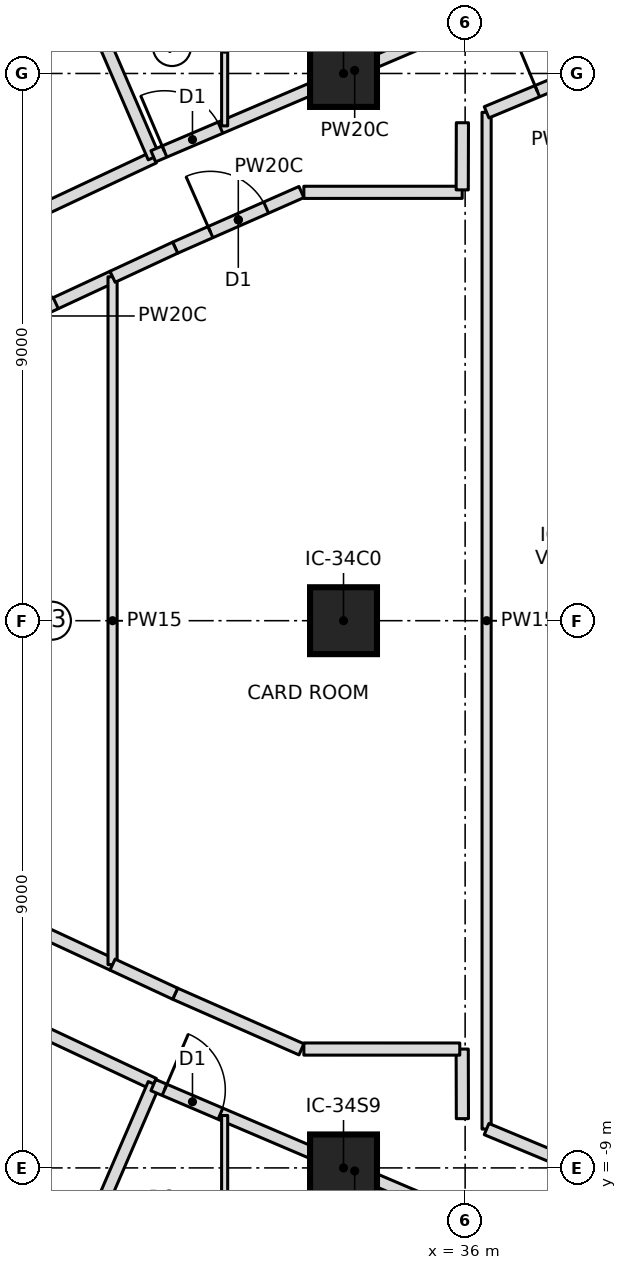
"""IFC4 building model, lengths in metres.
Left out: names, types, materials, properties, quantities, classifications, styles, units other than length and angle.
Written with IfcOpenShell. Run it as: python <this file> out.ifc"""

import sys

from ifc_helpers import new_model, si_unit, direction, frame, frame_2d, origin, origin_2d, place, context, subcontext, project, spatial, rectangle, extrude, element, fill, save


model = new_model("IFC4")
c1 = context("Model", 3, precision=1e-05, world=origin(), true_north=direction((0.0, 1.0)))
c2 = subcontext(c1, "Body", "Model", "MODEL_VIEW")
j1 = project(units=[si_unit("LENGTHUNIT", "METRE"), si_unit("PLANEANGLEUNIT", "RADIAN")], contexts=[c1])
p1 = place(None, origin())
s1 = spatial("IfcSite", under=j1, at=p1, CompositionType="ELEMENT")
p2 = place(p1, origin())
s2 = spatial("IfcBuilding", under=s1, at=p2, CompositionType="ELEMENT")
p3 = place(p2, frame((0.0, 0.0, 144.4)))
s3 = spatial("IfcBuildingStorey", under=s2, at=p3, CompositionType="ELEMENT", Elevation=144.4)
for number, where, z_axis, x_axis in (
    (1, (34.0, -9.0, 0.0), (0.0, 0.0, 1.0), (1.0, 0.0, 0.0)),
    (2, (34.0, 0.0, 0.0), (0.0, 0.0, 1.0), (1.0, 0.0, 0.0)),
    (3, (34.0, 9.0, 0.0), (0.0, 0.0, 1.0), (1.0, 0.0, 0.0)),
):
    element("IfcColumn", number, at=place(p3, frame(where, z_axis=z_axis, x_axis=x_axis)), inside=s3, PredefinedType="COLUMN", context=c2, shape_type="SweptSolid", body=[
        extrude(rectangle(XDim=1.1, YDim=1.1, at=origin_2d()), origin(), (0.0, 0.0, 1.0), 3.55),
    ])
p4 = place(p3, frame((24.36, 4.557, 0.0), z_axis=(0.0, 0.0, 1.0), x_axis=(0.905157912263, 0.425075468439, 0.0)))
e4 = element("IfcWall", 4, at=p4, inside=s3, PredefinedType="PARTITIONING", context=c2, shape_type="SweptSolid", body=[
    extrude(rectangle(XDim=7.203, YDim=0.2, at=frame_2d((3.602, 0.0))), origin(), (0.0, 0.0, 1.0), 3.25),
])
p5 = place(p4, frame((3.7, 0.0, 0.0)))
e5 = element("IfcOpeningElement", 5, at=p5, cuts=e4, PredefinedType="OPENING", context=c2, shape_type="SweptSolid", body=[
    extrude(rectangle(XDim=1.0, YDim=2.1, at=frame_2d((0.5, 1.05))), frame((0.0, 0.11, 0.0), z_axis=(0.0, -1.0, 0.0), x_axis=(1.0, 0.0, 0.0)), (0.0, 0.0, 1.0), 0.22),
])
p6 = place(p3, frame((30.88, 7.619, 0.0), z_axis=(0.0, 0.0, 1.0), x_axis=(-0.395976934703, 0.91826045716, 0.0)))
e6 = element("IfcWall", 6, at=p6, inside=s3, PredefinedType="PARTITIONING", context=c2, shape_type="SweptSolid", body=[
    extrude(rectangle(XDim=7.6, YDim=0.2, at=frame_2d((3.8, 0.0))), origin(), (0.0, 0.0, 1.0), 3.25),
])
p7 = place(p3, frame((30.872, 7.638, 0.0), z_axis=(0.0, 0.0, 1.0), x_axis=(0.919834621271, 0.392306346509, 0.0)))
e7 = element("IfcWall", 7, at=p7, inside=s3, PredefinedType="PARTITIONING", context=c2, shape_type="SweptSolid", body=[
    extrude(rectangle(XDim=7.2, YDim=0.2, at=frame_2d((3.6, 0.0))), origin(), (0.0, 0.0, 1.0), 3.25),
])
p8 = place(p7, frame((0.2, 0.0, 0.0)))
e8 = element("IfcOpeningElement", 8, at=p8, cuts=e7, PredefinedType="OPENING", context=c2, shape_type="SweptSolid", body=[
    extrude(rectangle(XDim=1.0, YDim=2.1, at=frame_2d((0.5, 1.05))), frame((0.0, 0.11, 0.0), z_axis=(0.0, -1.0, 0.0), x_axis=(1.0, 0.0, 0.0)), (0.0, 0.0, 1.0), 0.22),
])
p9 = place(p3, frame((24.36, -4.557, 0.0), z_axis=(0.0, 0.0, 1.0), x_axis=(0.905157912263, -0.425075468439, 0.0)))
e9 = element("IfcWall", 9, at=p9, inside=s3, PredefinedType="PARTITIONING", context=c2, shape_type="SweptSolid", body=[
    extrude(rectangle(XDim=7.203, YDim=0.2, at=frame_2d((3.602, 0.0))), origin(), (0.0, 0.0, 1.0), 3.25),
])
p10 = place(p9, frame((3.7, 0.0, 0.0)))
e10 = element("IfcOpeningElement", 10, at=p10, cuts=e9, PredefinedType="OPENING", context=c2, shape_type="SweptSolid", body=[
    extrude(rectangle(XDim=1.0, YDim=2.1, at=frame_2d((0.5, 1.05))), frame((0.0, 0.11, 0.0), z_axis=(0.0, -1.0, 0.0), x_axis=(1.0, 0.0, 0.0)), (0.0, 0.0, 1.0), 0.22),
])
p11 = place(p3, frame((27.87, -14.598, 0.0), z_axis=(0.0, 0.0, 1.0), x_axis=(0.395976934703, 0.91826045716, 0.0)))
e11 = element("IfcWall", 11, at=p11, inside=s3, PredefinedType="PARTITIONING", context=c2, shape_type="SweptSolid", body=[
    extrude(rectangle(XDim=7.6, YDim=0.2, at=frame_2d((3.8, 0.0))), origin(), (0.0, 0.0, 1.0), 3.25),
])
p12 = place(p3, frame((30.872, -7.638, 0.0), z_axis=(0.0, 0.0, 1.0), x_axis=(0.919834621271, -0.392306346509, 0.0)))
e12 = element("IfcWall", 12, at=p12, inside=s3, PredefinedType="PARTITIONING", context=c2, shape_type="SweptSolid", body=[
    extrude(rectangle(XDim=7.2, YDim=0.2, at=frame_2d((3.6, 0.0))), origin(), (0.0, 0.0, 1.0), 3.25),
])
p13 = place(p12, frame((0.2, 0.0, 0.0)))
e13 = element("IfcOpeningElement", 13, at=p13, cuts=e12, PredefinedType="OPENING", context=c2, shape_type="SweptSolid", body=[
    extrude(rectangle(XDim=1.0, YDim=2.1, at=frame_2d((0.5, 1.05))), frame((0.0, 0.11, 0.0), z_axis=(0.0, -1.0, 0.0), x_axis=(1.0, 0.0, 0.0)), (0.0, 0.0, 1.0), 0.22),
])
p14 = place(p3, frame((27.427, 4.367, 0.0), z_axis=(0.0, 0.0, 1.0), x_axis=(0.906842391635, 0.42146990015, 0.0)))
e14 = element("IfcWall", 14, at=p14, inside=s3, PredefinedType="PARTITIONING", context=c2, shape_type="SweptSolid", body=[
    extrude(rectangle(XDim=3.06, YDim=0.2, at=frame_2d((1.53, 0.0))), origin(), (0.0, 0.0, 1.0), 3.25),
])
p15 = place(p14, frame((1.03, 0.0, 0.0)))
e15 = element("IfcOpeningElement", 15, at=p15, cuts=e14, PredefinedType="OPENING", context=c2, shape_type="SweptSolid", body=[
    extrude(rectangle(XDim=1.0, YDim=2.1, at=frame_2d((0.5, 1.05))), frame((0.0, 0.11, 0.0), z_axis=(0.0, -1.0, 0.0), x_axis=(1.0, 0.0, 0.0)), (0.0, 0.0, 1.0), 0.22),
])
p16 = place(p3, frame((30.202, -5.656, 0.0), z_axis=(0.0, 0.0, 1.0), x_axis=(-0.906842391635, 0.42146990015, 0.0)))
e16 = element("IfcWall", 16, at=p16, inside=s3, PredefinedType="PARTITIONING", context=c2, shape_type="SweptSolid", body=[
    extrude(rectangle(XDim=3.06, YDim=0.2, at=frame_2d((1.53, 0.0))), origin(), (0.0, 0.0, 1.0), 3.25),
])
p17 = place(p3, frame((30.202, -5.656, 0.0), z_axis=(0.0, 0.0, 1.0), x_axis=(0.0, 1.0, 0.0)))
e17 = element("IfcWall", 17, at=p17, inside=s3, PredefinedType="PARTITIONING", context=c2, shape_type="SweptSolid", body=[
    extrude(rectangle(XDim=11.313, YDim=0.15, at=frame_2d((5.656, 0.0))), origin(), (0.0, 0.0, 1.0), 3.25),
])
p18 = place(p3, frame((31.231, 6.135, 0.0), z_axis=(0.0, 0.0, 1.0), x_axis=(0.915102334452, 0.403221672881, 0.0)))
e18 = element("IfcWall", 18, at=p18, inside=s3, PredefinedType="PARTITIONING", context=c2, shape_type="SweptSolid", body=[
    extrude(rectangle(XDim=2.269, YDim=0.2, at=frame_2d((1.135, 0.0))), origin(), (0.0, 0.0, 1.0), 3.25),
])
p19 = place(p18, frame((0.635, 0.0, 0.0)))
e19 = element("IfcOpeningElement", 19, at=p19, cuts=e18, PredefinedType="OPENING", context=c2, shape_type="SweptSolid", body=[
    extrude(rectangle(XDim=1.0, YDim=2.1, at=frame_2d((0.5, 1.05))), frame((0.0, 0.11, 0.0), z_axis=(0.0, -1.0, 0.0), x_axis=(1.0, 0.0, 0.0)), (0.0, 0.0, 1.0), 0.22),
])
p20 = place(p3, frame((33.308, -7.05, 0.0), z_axis=(0.0, 0.0, 1.0), x_axis=(-0.915102334452, 0.403221672881, 0.0)))
e20 = element("IfcWall", 20, at=p20, inside=s3, PredefinedType="PARTITIONING", context=c2, shape_type="SweptSolid", body=[
    extrude(rectangle(XDim=2.269, YDim=0.2, at=frame_2d((1.135, 0.0))), origin(), (0.0, 0.0, 1.0), 3.25),
])
for number, where, z_axis, x_axis in (
    (21, (31.231, -6.135, 0.0), (0.0, 0.0, 1.0), (-0.907, 0.422, 0.0)),
    (22, (30.202, 5.656, 0.0), (0.0, 0.0, 1.0), (0.907, 0.422, 0.0)),
):
    element("IfcWall", number, at=place(p3, frame(where, z_axis=z_axis, x_axis=x_axis)), inside=s3, PredefinedType="PARTITIONING", context=c2, shape_type="SweptSolid", body=[
        extrude(rectangle(XDim=1.135, YDim=0.2, at=frame_2d((0.567, 0.0))), origin(), (0.0, 0.0, 1.0), 3.25),
    ])
p21 = place(p3, frame((36.353, -8.361, 0.0), z_axis=(0.0, 0.0, 1.0), x_axis=(0.0, 1.0, 0.0)))
e23 = element("IfcWall", 23, at=p21, inside=s3, PredefinedType="PARTITIONING", context=c2, shape_type="SweptSolid", body=[
    extrude(rectangle(XDim=16.722, YDim=0.15, at=frame_2d((8.361, 0.0))), origin(), (0.0, 0.0, 1.0), 3.25),
])
p22 = place(p3, frame((36.353, 8.361, 0.0), z_axis=(0.0, 0.0, 1.0), x_axis=(0.922997109092, 0.384806882224, 0.0)))
e24 = element("IfcWall", 24, at=p22, inside=s3, PredefinedType="PARTITIONING", context=c2, shape_type="SweptSolid", body=[
    extrude(rectangle(XDim=2.806, YDim=0.2, at=frame_2d((1.403, 0.0))), origin(), (0.0, 0.0, 1.0), 3.25),
])
p23 = place(p22, frame((0.903, 0.0, 0.0)))
e25 = element("IfcOpeningElement", 25, at=p23, cuts=e24, PredefinedType="OPENING", context=c2, shape_type="SweptSolid", body=[
    extrude(rectangle(XDim=1.0, YDim=2.1, at=frame_2d((0.5, 1.05))), frame((0.0, 0.11, 0.0), z_axis=(0.0, -1.0, 0.0), x_axis=(1.0, 0.0, 0.0)), (0.0, 0.0, 1.0), 0.22),
])
p24 = place(p3, frame((38.943, -9.441, 0.0), z_axis=(0.0, 0.0, 1.0), x_axis=(-0.922997109092, 0.384806882224, 0.0)))
e26 = element("IfcWall", 26, at=p24, inside=s3, PredefinedType="PARTITIONING", context=c2, shape_type="SweptSolid", body=[
    extrude(rectangle(XDim=2.806, YDim=0.2, at=frame_2d((1.403, 0.0))), origin(), (0.0, 0.0, 1.0), 3.25),
])
for number, where, z_axis, x_axis in (
    (27, (32.045, 10.661, 0.0), (0.0, 0.0, 1.0), (0.0, -1.0, 0.0)),
    (28, (32.045, -8.138, 0.0), (0.0, 0.0, 1.0), (0.0, -1.0, 0.0)),
):
    element("IfcWall", number, at=place(p3, frame(where, z_axis=z_axis, x_axis=x_axis)), inside=s3, PredefinedType="PARTITIONING", context=c2, shape_type="SweptSolid", body=[
        extrude(rectangle(XDim=2.523, YDim=0.1, at=frame_2d((1.261, 0.0))), origin(), (0.0, 0.0, 1.0), 3.25),
    ])
p25 = place(p3, frame((35.955, -8.19, 0.0), z_axis=(0.0, 0.0, 1.0), x_axis=(-0.002773026881, 0.999996155154, 0.0)))
e29 = element("IfcWall", 29, at=p25, inside=s3, PredefinedType="PARTITIONING", context=c2, shape_type="SweptSolid", body=[
    extrude(rectangle(XDim=1.145, YDim=0.2, at=frame_2d((0.572, 0.0))), origin(), (0.0, 0.0, 1.0), 3.25),
])
p26 = place(p3, frame((35.912, -7.045, 0.0), z_axis=(0.0, 0.0, 1.0), x_axis=(-0.999999981873, 0.000190403652, 0.0)))
e30 = element("IfcWall", 30, at=p26, inside=s3, PredefinedType="PARTITIONING", context=c2, shape_type="SweptSolid", body=[
    extrude(rectangle(XDim=2.564, YDim=0.2, at=frame_2d((1.282, 0.0))), origin(), (0.0, 0.0, 1.0), 3.25),
])
p27 = place(p3, frame((33.347, 7.045, 0.0), z_axis=(0.0, 0.0, 1.0), x_axis=(0.999999982426, 0.000187476562, 0.0)))
e31 = element("IfcWall", 31, at=p27, inside=s3, PredefinedType="PARTITIONING", context=c2, shape_type="SweptSolid", body=[
    extrude(rectangle(XDim=2.604, YDim=0.2, at=frame_2d((1.302, 0.0))), origin(), (0.0, 0.0, 1.0), 3.25),
])
p28 = place(p3, frame((35.952, 7.085, 0.0), z_axis=(0.0, 0.0, 1.0), x_axis=(0.002873551354, 0.999995871343, 0.0)))
e32 = element("IfcWall", 32, at=p28, inside=s3, PredefinedType="PARTITIONING", context=c2, shape_type="SweptSolid", body=[
    extrude(rectangle(XDim=1.104, YDim=0.2, at=frame_2d((0.552, 0.0))), origin(), (0.0, 0.0, 1.0), 3.25),
])
p29 = place(p8, origin())
e33 = element("IfcDoor", 33, at=p29, inside=s3, OperationType="SINGLE_SWING_LEFT", PredefinedType="DOOR", context=c2, shape_type="SweptSolid", body=[
    extrude(rectangle(XDim=1.0, YDim=2.1, at=frame_2d((0.5, 1.05))), frame((0.0, 0.025, 0.0), z_axis=(0.0, -1.0, 0.0), x_axis=(1.0, 0.0, 0.0)), (0.0, 0.0, 1.0), 0.05),
])
fill(e8, e33)
p30 = place(p13, origin())
e34 = element("IfcDoor", 34, at=p30, inside=s3, OperationType="SINGLE_SWING_LEFT", PredefinedType="DOOR", context=c2, shape_type="SweptSolid", body=[
    extrude(rectangle(XDim=1.0, YDim=2.1, at=frame_2d((0.5, 1.05))), frame((0.0, 0.025, 0.0), z_axis=(0.0, -1.0, 0.0), x_axis=(1.0, 0.0, 0.0)), (0.0, 0.0, 1.0), 0.05),
])
fill(e13, e34)
p31 = place(p15, origin())
e35 = element("IfcDoor", 35, at=p31, inside=s3, OperationType="SINGLE_SWING_RIGHT", PredefinedType="DOOR", context=c2, shape_type="SweptSolid", body=[
    extrude(rectangle(XDim=1.0, YDim=2.1, at=frame_2d((0.5, 1.05))), frame((0.0, 0.025, 0.0), z_axis=(0.0, -1.0, 0.0), x_axis=(1.0, 0.0, 0.0)), (0.0, 0.0, 1.0), 0.05),
])
fill(e15, e35)
p32 = place(p19, origin())
e36 = element("IfcDoor", 36, at=p32, inside=s3, OperationType="SINGLE_SWING_LEFT", PredefinedType="DOOR", context=c2, shape_type="SweptSolid", body=[
    extrude(rectangle(XDim=1.0, YDim=2.1, at=frame_2d((0.5, 1.05))), frame((0.0, 0.025, 0.0), z_axis=(0.0, -1.0, 0.0), x_axis=(1.0, 0.0, 0.0)), (0.0, 0.0, 1.0), 0.05),
])
fill(e19, e36)
p33 = place(p23, origin())
e37 = element("IfcDoor", 37, at=p33, inside=s3, OperationType="SINGLE_SWING_RIGHT", PredefinedType="DOOR", context=c2, shape_type="SweptSolid", body=[
    extrude(rectangle(XDim=1.0, YDim=2.1, at=frame_2d((0.5, 1.05))), frame((0.0, 0.025, 0.0), z_axis=(0.0, -1.0, 0.0), x_axis=(1.0, 0.0, 0.0)), (0.0, 0.0, 1.0), 0.05),
])
fill(e25, e37)
save(model, sys.argv[1])
